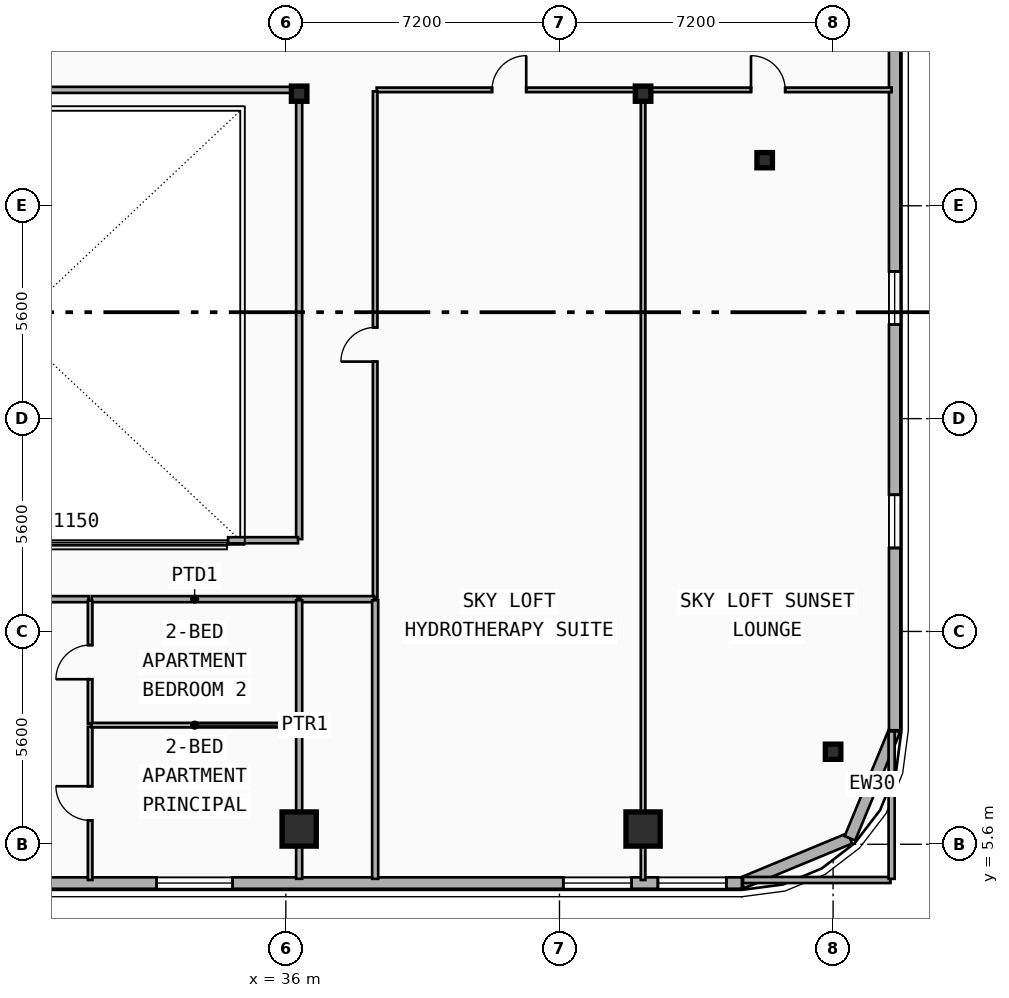
"""IFC4 building model, lengths in metres.
Left out: names, types, materials, properties, quantities, classifications, styles, units other than length and angle.
Written with IfcOpenShell. Run it as: python <this file> out.ifc"""

import sys

from ifc_helpers import new_model, si_unit, direction, frame, frame_2d, origin, origin_2d, place, context, subcontext, project, spatial, rectangle, i_section, extrude, element, fill, save


model = new_model("IFC4")
c1 = context("Model", 3, precision=1e-05, world=origin(), true_north=direction((0.0, 1.0)))
c2 = subcontext(c1, "Body", "Model", "MODEL_VIEW")
j1 = project(units=[si_unit("LENGTHUNIT", "METRE"), si_unit("PLANEANGLEUNIT", "RADIAN")], contexts=[c1])
p1 = place(None, origin())
s1 = spatial("IfcSite", under=j1, at=p1, CompositionType="ELEMENT")
p2 = place(p1, origin())
s2 = spatial("IfcBuilding", under=s1, at=p2, CompositionType="ELEMENT")
p3 = place(p2, frame((0.0, 0.0, 222.0)))
s3 = spatial("IfcBuildingStorey", under=s2, at=p3, CompositionType="ELEMENT", Elevation=222.0)
for number, where, z_axis, x_axis in (
    (1, (36.35, 25.35, 0.0), (0.0, 0.0, 1.0), (1.0, 0.0, 0.0)),
    (2, (45.4, 25.35, 0.0), (0.0, 0.0, 1.0), (1.0, 0.0, 0.0)),
):
    element("IfcColumn", number, at=place(p3, frame(where, z_axis=z_axis, x_axis=x_axis)), inside=s3, PredefinedType="COLUMN", context=c2, shape_type="SweptSolid", body=[
        extrude(i_section(OverallWidth=0.408, OverallDepth=0.4, WebThickness=0.025, FlangeThickness=0.039, FilletRadius=0.015, at=origin_2d()), origin(), (0.0, 0.0, 1.0), 3.6),
    ])
for number, where, z_axis, x_axis in (
    (3, (36.35, 6.11, 0.0), (0.0, -0.09, 0.996), (1.0, 0.0, 0.0)),
    (4, (45.4, 6.11, 0.0), (0.0, -0.09, 0.996), (1.0, 0.0, 0.0)),
):
    element("IfcColumn", number, at=place(p3, frame(where, z_axis=z_axis, x_axis=x_axis)), inside=s3, PredefinedType="COLUMN", context=c2, shape_type="SweptSolid", body=[
        extrude(rectangle(XDim=0.9, YDim=0.9, at=origin_2d()), origin(), (0.0, 0.0, 1.0), 3.615),
    ])
p4 = place(p3, frame((48.6, 23.6, 0.0), z_axis=(0.0, 0.0, 1.0), x_axis=(1.0, 0.0, 0.0)))
e5 = element("IfcColumn", 5, at=p4, inside=s3, PredefinedType="COLUMN", context=c2, shape_type="SweptSolid", body=[
    extrude(i_section(OverallWidth=0.408, OverallDepth=0.4, WebThickness=0.025, FlangeThickness=0.039, FilletRadius=0.015, at=origin_2d()), origin(), (0.0, 0.0, 1.0), 3.6),
])
p5 = place(p3, frame((50.4, 8.131, 0.0), z_axis=(0.0, -0.079833884609, 0.996808181582), x_axis=(1.0, 0.0, 0.0)))
e6 = element("IfcColumn", 6, at=p5, inside=s3, PredefinedType="COLUMN", context=c2, shape_type="SweptSolid", body=[
    extrude(i_section(OverallWidth=0.408, OverallDepth=0.4, WebThickness=0.025, FlangeThickness=0.039, FilletRadius=0.015, at=origin_2d()), origin(), (0.0, 0.0, 1.0), 3.612),
])
p6 = place(p3, frame((50.843, 5.757, 0.0), z_axis=(0.0, 0.0, 1.0), x_axis=(-0.92389884758, -0.382636798336, 0.0)))
e7 = element("IfcWall", 7, at=p6, inside=s3, PredefinedType="SOLIDWALL", context=c2, shape_type="SweptSolid", body=[
    extrude(rectangle(XDim=3.077, YDim=0.3, at=frame_2d((1.538, 0.0))), origin(), (0.0, 0.0, 1.0), 3.34),
])
p7 = place(p3, frame((52.02, 8.6, 0.0), z_axis=(0.0, 0.0, 1.0), x_axis=(-0.382676475685, -0.923882414032, 0.0)))
e8 = element("IfcWall", 8, at=p7, inside=s3, PredefinedType="SOLIDWALL", context=c2, shape_type="SweptSolid", body=[
    extrude(rectangle(XDim=3.077, YDim=0.3, at=frame_2d((1.539, 0.0))), origin(), (0.0, 0.0, 1.0), 3.34),
])
p8 = place(p3, frame((52.02, 37.2, 0.0), z_axis=(0.0, 0.0, 1.0), x_axis=(0.0, -1.0, 0.0)))
e9 = element("IfcWall", 9, at=p8, inside=s3, PredefinedType="SOLIDWALL", context=c2, shape_type="SweptSolid", body=[
    extrude(rectangle(XDim=28.6, YDim=0.3, at=frame_2d((14.3, 0.0))), origin(), (0.0, 0.0, 1.0), 3.34),
])
p9 = place(p8, frame((2.38, 0.0, 0.34)))
e10 = element("IfcOpeningElement", 10, at=p9, cuts=e9, PredefinedType="OPENING", context=c2, shape_type="SweptSolid", body=[
    extrude(rectangle(XDim=1.4, YDim=2.1, at=frame_2d((0.7, 1.05))), frame((0.0, 0.16, 0.0), z_axis=(0.0, -1.0, 0.0), x_axis=(1.0, 0.0, 0.0)), (0.0, 0.0, 1.0), 0.32),
])
p10 = place(p8, frame((5.84, 0.0, 0.34)))
e11 = element("IfcOpeningElement", 11, at=p10, cuts=e9, PredefinedType="OPENING", context=c2, shape_type="SweptSolid", body=[
    extrude(rectangle(XDim=1.4, YDim=2.1, at=frame_2d((0.7, 1.05))), frame((0.0, 0.16, 0.0), z_axis=(0.0, -1.0, 0.0), x_axis=(1.0, 0.0, 0.0)), (0.0, 0.0, 1.0), 0.32),
])
p11 = place(p8, frame((16.527, 0.0, 0.34)))
e12 = element("IfcOpeningElement", 12, at=p11, cuts=e9, PredefinedType="OPENING", context=c2, shape_type="SweptSolid", body=[
    extrude(rectangle(XDim=1.4, YDim=2.1, at=frame_2d((0.7, 1.05))), frame((0.0, 0.16, 0.0), z_axis=(0.0, -1.0, 0.0), x_axis=(1.0, 0.0, 0.0)), (0.0, 0.0, 1.0), 0.32),
])
p12 = place(p8, frame((22.403, 0.0, 0.34)))
e13 = element("IfcOpeningElement", 13, at=p12, cuts=e9, PredefinedType="OPENING", context=c2, shape_type="SweptSolid", body=[
    extrude(rectangle(XDim=1.4, YDim=2.1, at=frame_2d((0.7, 1.05))), frame((0.0, 0.16, 0.0), z_axis=(0.0, -1.0, 0.0), x_axis=(1.0, 0.0, 0.0)), (0.0, 0.0, 1.0), 0.32),
])
p13 = place(p3, frame((48.0, 4.58, 0.0), z_axis=(0.0, 0.0, 1.0), x_axis=(-1.0, 0.0, 0.0)))
e14 = element("IfcWall", 14, at=p13, inside=s3, PredefinedType="SOLIDWALL", context=c2, shape_type="SweptSolid", body=[
    extrude(rectangle(XDim=38.4, YDim=0.3, at=frame_2d((19.2, 0.0))), origin(), (0.0, 0.0, 1.0), 3.34),
])
p14 = place(p13, frame((36.19, 0.0, 0.48)))
e15 = element("IfcOpeningElement", 15, at=p14, cuts=e14, PredefinedType="OPENING", context=c2, shape_type="SweptSolid", body=[
    extrude(rectangle(XDim=1.8, YDim=1.8, at=frame_2d((0.9, 0.9))), frame((0.0, 0.16, 0.0), z_axis=(0.0, -1.0, 0.0), x_axis=(1.0, 0.0, 0.0)), (0.0, 0.0, 1.0), 0.32),
])
p15 = place(p13, frame((33.912, 0.0, 1.05)))
e16 = element("IfcOpeningElement", 16, at=p15, cuts=e14, PredefinedType="OPENING", context=c2, shape_type="SweptSolid", body=[
    extrude(rectangle(XDim=1.2, YDim=1.5, at=frame_2d((0.6, 0.75))), frame((0.0, 0.16, 0.0), z_axis=(0.0, -1.0, 0.0), x_axis=(1.0, 0.0, 0.0)), (0.0, 0.0, 1.0), 0.32),
])
p16 = place(p13, frame((20.0, 0.0, 0.65)))
e17 = element("IfcOpeningElement", 17, at=p16, cuts=e14, PredefinedType="OPENING", context=c2, shape_type="SweptSolid", body=[
    extrude(rectangle(XDim=2.0, YDim=2.2, at=frame_2d((1.0, 1.1))), frame((0.0, 0.16, 0.0), z_axis=(0.0, -1.0, 0.0), x_axis=(1.0, 0.0, 0.0)), (0.0, 0.0, 1.0), 0.32),
])
p17 = place(p13, frame((25.3, 0.0, 0.48)))
e18 = element("IfcOpeningElement", 18, at=p17, cuts=e14, PredefinedType="OPENING", context=c2, shape_type="SweptSolid", body=[
    extrude(rectangle(XDim=1.8, YDim=1.8, at=frame_2d((0.9, 0.9))), frame((0.0, 0.16, 0.0), z_axis=(0.0, -1.0, 0.0), x_axis=(1.0, 0.0, 0.0)), (0.0, 0.0, 1.0), 0.32),
])
p18 = place(p13, frame((13.4, 0.0, 0.65)))
e19 = element("IfcOpeningElement", 19, at=p18, cuts=e14, PredefinedType="OPENING", context=c2, shape_type="SweptSolid", body=[
    extrude(rectangle(XDim=2.0, YDim=2.2, at=frame_2d((1.0, 1.1))), frame((0.0, 0.16, 0.0), z_axis=(0.0, -1.0, 0.0), x_axis=(1.0, 0.0, 0.0)), (0.0, 0.0, 1.0), 0.32),
])
p19 = place(p13, frame((2.9, 0.0, 0.34)))
e20 = element("IfcOpeningElement", 20, at=p19, cuts=e14, PredefinedType="OPENING", context=c2, shape_type="SweptSolid", body=[
    extrude(rectangle(XDim=1.8, YDim=1.8, at=frame_2d((0.9, 0.9))), frame((0.0, 0.16, 0.0), z_axis=(0.0, -1.0, 0.0), x_axis=(1.0, 0.0, 0.0)), (0.0, 0.0, 1.0), 0.32),
])
p20 = place(p13, frame((0.41, 0.0, 0.48)))
e21 = element("IfcOpeningElement", 21, at=p20, cuts=e14, PredefinedType="OPENING", context=c2, shape_type="SweptSolid", body=[
    extrude(rectangle(XDim=1.8, YDim=1.8, at=frame_2d((0.9, 0.9))), frame((0.0, 0.16, 0.0), z_axis=(0.0, -1.0, 0.0), x_axis=(1.0, 0.0, 0.0)), (0.0, 0.0, 1.0), 0.32),
])
p21 = place(p3, frame((38.39, 25.45, 0.0), z_axis=(0.0, 0.0, 1.0), x_axis=(1.0, 0.0, 0.0)))
e22 = element("IfcWall", 22, at=p21, inside=s3, PredefinedType="PARTITIONING", context=c2, shape_type="SweptSolid", body=[
    extrude(rectangle(XDim=6.97, YDim=0.12, at=frame_2d((3.485, 0.0))), origin(), (0.0, 0.0, 1.0), 2.52),
])
p22 = place(p21, frame((3.035, 0.0, 0.0)))
e23 = element("IfcOpeningElement", 23, at=p22, cuts=e22, PredefinedType="OPENING", context=c2, shape_type="SweptSolid", body=[
    extrude(rectangle(XDim=0.9, YDim=2.1, at=frame_2d((0.45, 1.05))), frame((0.0, 0.07, 0.0), z_axis=(0.0, -1.0, 0.0), x_axis=(1.0, 0.0, 0.0)), (0.0, 0.0, 1.0), 0.14),
])
p23 = place(p3, frame((45.44, 25.45, 0.0), z_axis=(0.0, 0.0, 1.0), x_axis=(1.0, 0.0, 0.0)))
e24 = element("IfcWall", 24, at=p23, inside=s3, PredefinedType="PARTITIONING", context=c2, shape_type="SweptSolid", body=[
    extrude(rectangle(XDim=6.5, YDim=0.12, at=frame_2d((3.25, 0.0))), origin(), (0.0, 0.0, 1.0), 2.52),
])
p24 = place(p23, frame((2.8, 0.0, 0.0)))
e25 = element("IfcOpeningElement", 25, at=p24, cuts=e24, PredefinedType="OPENING", context=c2, shape_type="SweptSolid", body=[
    extrude(rectangle(XDim=0.9, YDim=2.1, at=frame_2d((0.45, 1.05))), frame((0.0, 0.07, 0.0), z_axis=(0.0, -1.0, 0.0), x_axis=(1.0, 0.0, 0.0)), (0.0, 0.0, 1.0), 0.14),
])
p25 = place(p3, frame((38.35, 12.09, 0.0), z_axis=(0.0, 0.0, 1.0), x_axis=(0.0, 1.0, 0.0)))
e26 = element("IfcWall", 26, at=p25, inside=s3, PredefinedType="PARTITIONING", context=c2, shape_type="SweptSolid", body=[
    extrude(rectangle(XDim=13.32, YDim=0.12, at=frame_2d((6.66, 0.0))), origin(), (0.0, 0.0, 1.0), 2.82),
])
p26 = place(p25, frame((6.21, 0.0, 0.0)))
e27 = element("IfcOpeningElement", 27, at=p26, cuts=e26, PredefinedType="OPENING", context=c2, shape_type="SweptSolid", body=[
    extrude(rectangle(XDim=0.9, YDim=2.1, at=frame_2d((0.45, 1.05))), frame((0.0, 0.07, 0.0), z_axis=(0.0, -1.0, 0.0), x_axis=(1.0, 0.0, 0.0)), (0.0, 0.0, 1.0), 0.14),
])
p27 = place(p3, frame((23.19, 12.05, 0.0), z_axis=(0.0, 0.0, 1.0), x_axis=(1.0, 0.0, 0.0)))
e28 = element("IfcWall", 28, at=p27, inside=s3, PredefinedType="PARTITIONING", context=c2, shape_type="SweptSolid", body=[
    extrude(rectangle(XDim=7.62, YDim=0.16, at=frame_2d((3.81, 0.0))), origin(), (0.0, 0.0, 1.0), 2.52),
])
p28 = place(p27, frame((3.31, 0.0, 0.0)))
e29 = element("IfcOpeningElement", 29, at=p28, cuts=e28, PredefinedType="OPENING", context=c2, shape_type="SweptSolid", body=[
    extrude(rectangle(XDim=1.0, YDim=2.15, at=frame_2d((0.5, 1.075))), frame((0.0, 0.09, 0.0), z_axis=(0.0, -1.0, 0.0), x_axis=(1.0, 0.0, 0.0)), (0.0, 0.0, 1.0), 0.18),
])
p29 = place(p3, frame((30.89, 12.05, 0.0), z_axis=(0.0, 0.0, 1.0), x_axis=(1.0, 0.0, 0.0)))
e30 = element("IfcWall", 30, at=p29, inside=s3, PredefinedType="PARTITIONING", context=c2, shape_type="SweptSolid", body=[
    extrude(rectangle(XDim=5.42, YDim=0.16, at=frame_2d((2.71, 0.0))), origin(), (0.0, 0.0, 1.0), 2.52),
])
p30 = place(p3, frame((30.85, 4.66, 0.0), z_axis=(0.0, 0.0, 1.0), x_axis=(0.0, 1.0, 0.0)))
e31 = element("IfcWall", 31, at=p30, inside=s3, PredefinedType="PARTITIONING", context=c2, shape_type="SweptSolid", body=[
    extrude(rectangle(XDim=4.035, YDim=0.12, at=frame_2d((2.018, 0.0))), origin(), (0.0, 0.0, 1.0), 3.0),
])
p31 = place(p30, frame((1.567, 0.0, 0.0)))
e32 = element("IfcOpeningElement", 32, at=p31, cuts=e31, PredefinedType="OPENING", context=c2, shape_type="SweptSolid", body=[
    extrude(rectangle(XDim=0.9, YDim=2.1, at=frame_2d((0.45, 1.05))), frame((0.0, 0.07, 0.0), z_axis=(0.0, -1.0, 0.0), x_axis=(1.0, 0.0, 0.0)), (0.0, 0.0, 1.0), 0.14),
])
p32 = place(p3, frame((30.85, 8.775, 0.0), z_axis=(0.0, 0.0, 1.0), x_axis=(0.0, 1.0, 0.0)))
e33 = element("IfcWall", 33, at=p32, inside=s3, PredefinedType="PARTITIONING", context=c2, shape_type="SweptSolid", body=[
    extrude(rectangle(XDim=3.235, YDim=0.12, at=frame_2d((1.618, 0.0))), origin(), (0.0, 0.0, 1.0), 2.96),
])
p33 = place(p32, frame((1.167, 0.0, 0.0)))
e34 = element("IfcOpeningElement", 34, at=p33, cuts=e33, PredefinedType="OPENING", context=c2, shape_type="SweptSolid", body=[
    extrude(rectangle(XDim=0.9, YDim=2.1, at=frame_2d((0.45, 1.05))), frame((0.0, 0.07, 0.0), z_axis=(0.0, -1.0, 0.0), x_axis=(1.0, 0.0, 0.0)), (0.0, 0.0, 1.0), 0.14),
])
p34 = place(p3, frame((30.89, 8.735, 0.0), z_axis=(0.0, 0.0, 1.0), x_axis=(1.0, 0.0, 0.0)))
e35 = element("IfcWall", 35, at=p34, inside=s3, PredefinedType="PARTITIONING", context=c2, shape_type="SweptSolid", body=[
    extrude(rectangle(XDim=5.42, YDim=0.12, at=frame_2d((2.71, 0.0))), origin(), (0.0, 0.0, 1.0), 2.52),
])
p35 = place(p3, frame((45.4, 4.66, 0.0), z_axis=(0.0, 0.0, 1.0), x_axis=(0.0, 1.0, 0.0)))
e36 = element("IfcWall", 36, at=p35, inside=s3, PredefinedType="PARTITIONING", context=c2, shape_type="SweptSolid", body=[
    extrude(rectangle(XDim=20.75, YDim=0.12, at=frame_2d((10.375, 0.0))), origin(), (0.0, 0.0, 1.0), 2.52),
])
p36 = place(p3, frame((20.48, 25.45, 0.0), z_axis=(0.0, 0.0, 1.0), x_axis=(1.0, 0.0, 0.0)))
e37 = element("IfcWall", 37, at=p36, inside=s3, PredefinedType="PARTITIONING", context=c2, shape_type="SweptSolid", body=[
    extrude(rectangle(XDim=15.84, YDim=0.16, at=frame_2d((7.92, 0.0))), origin(), (0.0, 0.0, 1.0), 2.52),
])
p37 = place(p3, frame((36.38, 12.05, 0.0), z_axis=(0.0, 0.0, 1.0), x_axis=(1.0, 0.0, 0.0)))
e38 = element("IfcWall", 38, at=p37, inside=s3, PredefinedType="PARTITIONING", context=c2, shape_type="SweptSolid", body=[
    extrude(rectangle(XDim=1.94, YDim=0.16, at=frame_2d((0.97, 0.0))), origin(), (0.0, 0.0, 1.0), 2.52),
])
p38 = place(p3, frame((36.35, 13.63, 0.0), z_axis=(0.0, 0.0, 1.0), x_axis=(0.0, 1.0, 0.0)))
e39 = element("IfcWall", 39, at=p38, inside=s3, PredefinedType="PARTITIONING", context=c2, shape_type="SweptSolid", body=[
    extrude(rectangle(XDim=11.79, YDim=0.16, at=frame_2d((5.895, 0.0))), origin(), (0.0, 0.0, 1.0), 2.52),
])
p39 = place(p3, frame((34.48, 13.6, 0.0), z_axis=(0.0, 0.0, 1.0), x_axis=(1.0, 0.0, 0.0)))
e40 = element("IfcWall", 40, at=p39, inside=s3, PredefinedType="PARTITIONING", context=c2, shape_type="SweptSolid", body=[
    extrude(rectangle(XDim=1.84, YDim=0.16, at=frame_2d((0.92, 0.0))), origin(), (0.0, 0.0, 1.0), 2.52),
])
p40 = place(p3, frame((36.35, 4.69, 0.0), z_axis=(0.0, 0.0, 1.0), x_axis=(0.0, 1.0, 0.0)))
e41 = element("IfcWall", 41, at=p40, inside=s3, PredefinedType="PARTITIONING", context=c2, shape_type="SweptSolid", body=[
    extrude(rectangle(XDim=4.015, YDim=0.16, at=frame_2d((2.008, 0.0))), origin(), (0.0, 0.0, 1.0), 2.52),
])
p41 = place(p3, frame((36.35, 8.765, 0.0), z_axis=(0.0, 0.0, 1.0), x_axis=(0.0, 1.0, 0.0)))
e42 = element("IfcWall", 42, at=p41, inside=s3, PredefinedType="PARTITIONING", context=c2, shape_type="SweptSolid", body=[
    extrude(rectangle(XDim=3.255, YDim=0.16, at=frame_2d((1.627, 0.0))), origin(), (0.0, 0.0, 1.0), 2.52),
])
p42 = place(p3, frame((38.35, 4.69, 0.0), z_axis=(0.0, 0.0, 1.0), x_axis=(0.0, 1.0, 0.0)))
e43 = element("IfcWall", 43, at=p42, inside=s3, PredefinedType="PARTITIONING", context=c2, shape_type="SweptSolid", body=[
    extrude(rectangle(XDim=7.33, YDim=0.16, at=frame_2d((3.665, 0.0))), origin(), (0.0, 0.0, 1.0), 2.82),
])
p43 = place(p3, frame((48.03, 4.66, 0.0), z_axis=(0.0, 0.0, 1.0), x_axis=(1.0, 0.0, 0.0)))
e44 = element("IfcWall", 44, at=p43, inside=s3, PredefinedType="PARTITIONING", context=c2, shape_type="SweptSolid", body=[
    extrude(rectangle(XDim=3.88, YDim=0.16, at=frame_2d((1.94, 0.0))), origin(), (0.0, 0.0, 1.0), 3.34),
])
p44 = place(p3, frame((51.94, 4.69, 0.0), z_axis=(0.0, 0.0, 1.0), x_axis=(0.0, 1.0, 0.0)))
e45 = element("IfcWall", 45, at=p44, inside=s3, PredefinedType="PARTITIONING", context=c2, shape_type="SweptSolid", body=[
    extrude(rectangle(XDim=3.88, YDim=0.16, at=frame_2d((1.94, 0.0))), origin(), (0.0, 0.0, 1.0), 3.34),
])
p45 = place(p11, origin())
e46 = element("IfcWindow", 46, at=p45, inside=s3, PartitioningType="SINGLE_PANEL", PredefinedType="WINDOW", context=c2, shape_type="SweptSolid", body=[
    extrude(rectangle(XDim=1.4, YDim=2.1, at=frame_2d((0.7, 1.05))), frame((0.0, 0.03, 0.0), z_axis=(0.0, -1.0, 0.0), x_axis=(1.0, 0.0, 0.0)), (0.0, 0.0, 1.0), 0.06),
])
fill(e12, e46)
p46 = place(p12, origin())
e47 = element("IfcWindow", 47, at=p46, inside=s3, PartitioningType="SINGLE_PANEL", PredefinedType="WINDOW", context=c2, shape_type="SweptSolid", body=[
    extrude(rectangle(XDim=1.4, YDim=2.1, at=frame_2d((0.7, 1.05))), frame((0.0, 0.03, 0.0), z_axis=(0.0, -1.0, 0.0), x_axis=(1.0, 0.0, 0.0)), (0.0, 0.0, 1.0), 0.06),
])
fill(e13, e47)
p47 = place(p18, origin())
e48 = element("IfcWindow", 48, at=p47, inside=s3, PartitioningType="SINGLE_PANEL", PredefinedType="WINDOW", context=c2, shape_type="SweptSolid", body=[
    extrude(rectangle(XDim=2.0, YDim=2.2, at=frame_2d((1.0, 1.1))), frame((0.0, 0.03, 0.0), z_axis=(0.0, -1.0, 0.0), x_axis=(1.0, 0.0, 0.0)), (0.0, 0.0, 1.0), 0.06),
])
fill(e19, e48)
p48 = place(p19, origin())
e49 = element("IfcWindow", 49, at=p48, inside=s3, PartitioningType="SINGLE_PANEL", PredefinedType="WINDOW", context=c2, shape_type="SweptSolid", body=[
    extrude(rectangle(XDim=1.8, YDim=1.8, at=frame_2d((0.9, 0.9))), frame((0.0, 0.03, 0.0), z_axis=(0.0, -1.0, 0.0), x_axis=(1.0, 0.0, 0.0)), (0.0, 0.0, 1.0), 0.06),
])
fill(e20, e49)
p49 = place(p20, origin())
e50 = element("IfcWindow", 50, at=p49, inside=s3, PartitioningType="SINGLE_PANEL", PredefinedType="WINDOW", context=c2, shape_type="SweptSolid", body=[
    extrude(rectangle(XDim=1.8, YDim=1.8, at=frame_2d((0.9, 0.9))), frame((0.0, 0.03, 0.0), z_axis=(0.0, -1.0, 0.0), x_axis=(1.0, 0.0, 0.0)), (0.0, 0.0, 1.0), 0.06),
])
fill(e21, e50)
p50 = place(p22, origin())
e51 = element("IfcDoor", 51, at=p50, inside=s3, OperationType="SINGLE_SWING_RIGHT", PredefinedType="DOOR", context=c2, shape_type="SweptSolid", body=[
    extrude(rectangle(XDim=0.9, YDim=2.1, at=frame_2d((0.45, 1.05))), frame((0.0, 0.025, 0.0), z_axis=(0.0, -1.0, 0.0), x_axis=(1.0, 0.0, 0.0)), (0.0, 0.0, 1.0), 0.05),
])
fill(e23, e51)
p51 = place(p24, origin())
e52 = element("IfcDoor", 52, at=p51, inside=s3, OperationType="SINGLE_SWING_LEFT", PredefinedType="DOOR", context=c2, shape_type="SweptSolid", body=[
    extrude(rectangle(XDim=0.9, YDim=2.1, at=frame_2d((0.45, 1.05))), frame((0.0, 0.025, 0.0), z_axis=(0.0, -1.0, 0.0), x_axis=(1.0, 0.0, 0.0)), (0.0, 0.0, 1.0), 0.05),
])
fill(e25, e52)
p52 = place(p26, origin())
e53 = element("IfcDoor", 53, at=p52, inside=s3, OperationType="SINGLE_SWING_LEFT", PredefinedType="DOOR", context=c2, shape_type="SweptSolid", body=[
    extrude(rectangle(XDim=0.9, YDim=2.1, at=frame_2d((0.45, 1.05))), frame((0.0, 0.025, 0.0), z_axis=(0.0, -1.0, 0.0), x_axis=(1.0, 0.0, 0.0)), (0.0, 0.0, 1.0), 0.05),
])
fill(e27, e53)
p53 = place(p31, origin())
e54 = element("IfcDoor", 54, at=p53, inside=s3, OperationType="SINGLE_SWING_RIGHT", PredefinedType="DOOR", context=c2, shape_type="SweptSolid", body=[
    extrude(rectangle(XDim=0.9, YDim=2.1, at=frame_2d((0.45, 1.05))), frame((0.0, 0.025, 0.0), z_axis=(0.0, -1.0, 0.0), x_axis=(1.0, 0.0, 0.0)), (0.0, 0.0, 1.0), 0.05),
])
fill(e32, e54)
p54 = place(p33, origin())
e55 = element("IfcDoor", 55, at=p54, inside=s3, OperationType="SINGLE_SWING_LEFT", PredefinedType="DOOR", context=c2, shape_type="SweptSolid", body=[
    extrude(rectangle(XDim=0.9, YDim=2.1, at=frame_2d((0.45, 1.05))), frame((0.0, 0.025, 0.0), z_axis=(0.0, -1.0, 0.0), x_axis=(1.0, 0.0, 0.0)), (0.0, 0.0, 1.0), 0.05),
])
fill(e34, e55)
save(model, sys.argv[1])
